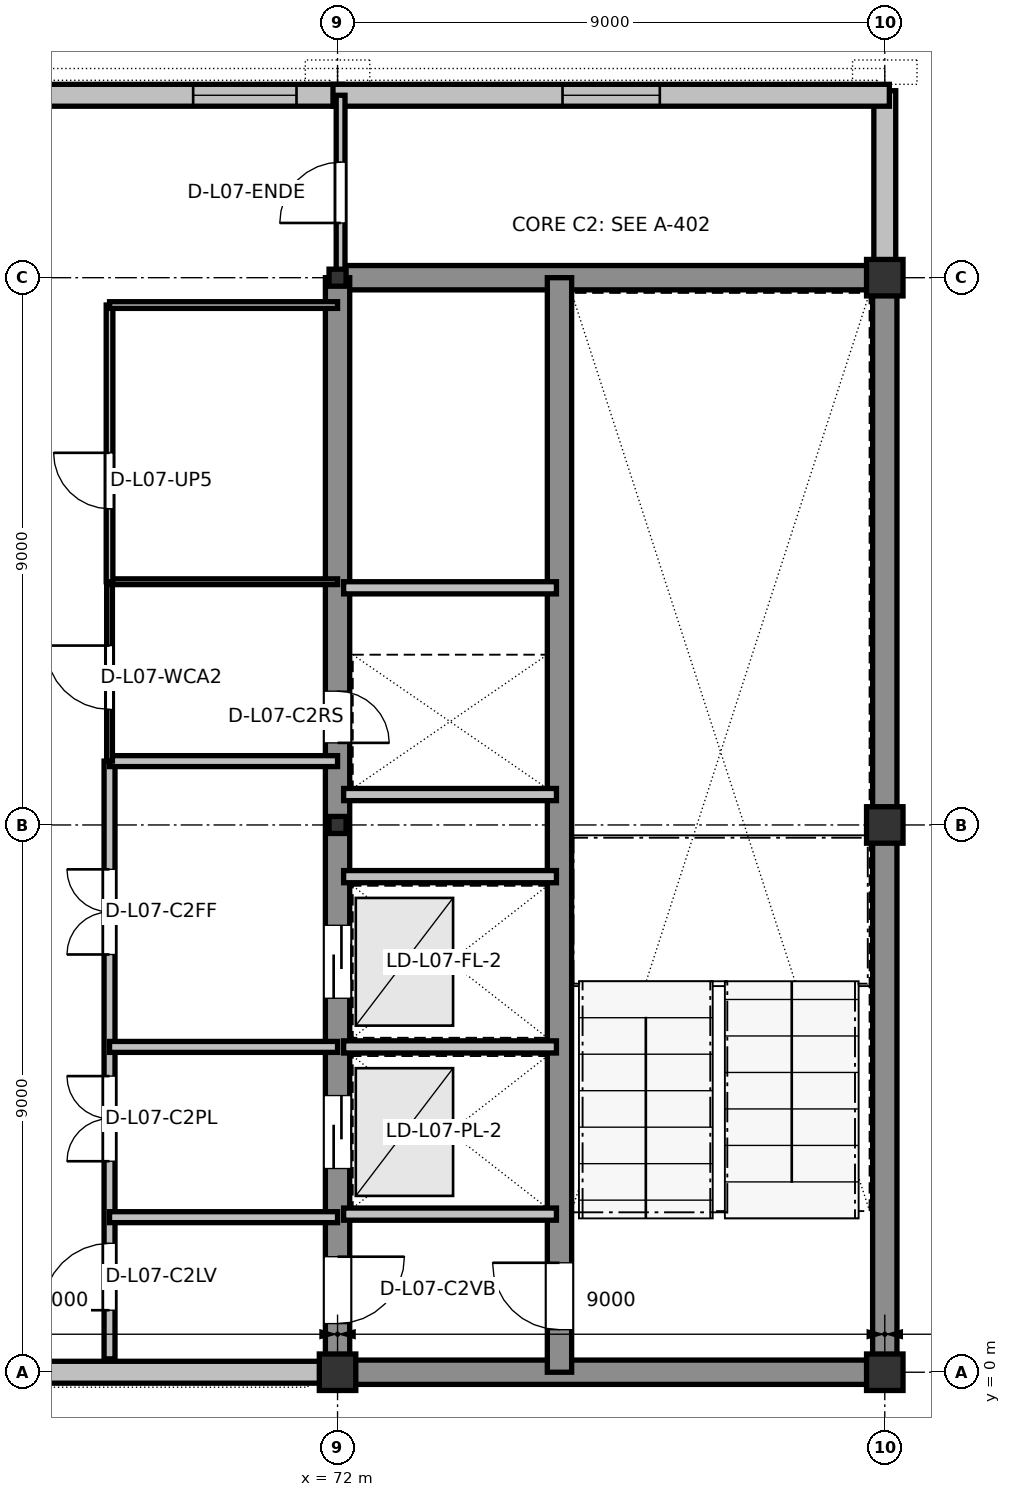
"""IFC4 building model, lengths in metres.
Left out: names, types, materials, properties, quantities, classifications, styles, units other than length and angle.
Written with IfcOpenShell. Run it as: python <this file> out.ifc"""

import sys

from ifc_helpers import new_model, si_unit, direction, frame, frame_2d, origin, origin_2d, place, context, subcontext, project, spatial, rectangle, i_section, extrude, element, fill, save


model = new_model("IFC4")
c1 = context("Model", 3, precision=1e-05, world=origin(), true_north=direction((0.0, 1.0)))
c2 = subcontext(c1, "Body", "Model", "MODEL_VIEW")
j1 = project(units=[si_unit("LENGTHUNIT", "METRE"), si_unit("PLANEANGLEUNIT", "RADIAN")], contexts=[c1])
p1 = place(None, origin())
s1 = spatial("IfcSite", under=j1, at=p1, CompositionType="ELEMENT")
p2 = place(p1, origin())
s2 = spatial("IfcBuilding", under=s1, at=p2, CompositionType="ELEMENT")
p3 = place(p2, frame((0.0, 0.0, 31.8)))
s3 = spatial("IfcBuildingStorey", under=s2, at=p3, CompositionType="ELEMENT", Elevation=31.8)
p4 = place(p3, frame((72.0, 0.0, 0.0), z_axis=(0.0, 0.0, 1.0), x_axis=(1.0, 0.0, 0.0)))
e1 = element("IfcColumn", 1, at=p4, inside=s3, PredefinedType="COLUMN", context=c2, shape_type="SweptSolid", body=[
    extrude(rectangle(XDim=0.6, YDim=0.6, at=origin_2d()), origin(), (0.0, 0.0, 1.0), 4.2),
])
for number, where, z_axis, x_axis in (
    (2, (72.0, 9.0, 0.0), (0.0, 0.0, 1.0), (1.0, 0.0, 0.0)),
    (3, (72.0, 18.0, 0.0), (0.0, 0.0, 1.0), (1.0, 0.0, 0.0)),
):
    element("IfcColumn", number, at=place(p3, frame(where, z_axis=z_axis, x_axis=x_axis)), inside=s3, PredefinedType="COLUMN", context=c2, shape_type="SweptSolid", body=[
        extrude(i_section(OverallWidth=0.28, OverallDepth=0.28, WebThickness=0.01, FlangeThickness=0.018, at=origin_2d()), origin(), (0.0, 0.0, 1.0), 4.2),
    ])
for number, where, z_axis, x_axis in (
    (4, (81.0, 0.0, 0.0), (0.0, 0.0, 1.0), (1.0, 0.0, 0.0)),
    (5, (81.0, 9.0, 0.0), (0.0, 0.0, 1.0), (1.0, 0.0, 0.0)),
    (6, (81.0, 18.0, 0.0), (0.0, 0.0, 1.0), (1.0, 0.0, 0.0)),
):
    element("IfcColumn", number, at=place(p3, frame(where, z_axis=z_axis, x_axis=x_axis)), inside=s3, PredefinedType="COLUMN", context=c2, shape_type="SweptSolid", body=[
        extrude(rectangle(XDim=0.6, YDim=0.6, at=origin_2d()), origin(), (0.0, 0.0, 1.0), 4.2),
    ])
p5 = place(p3, frame((81.0, 18.285, 0.0), z_axis=(0.0, 0.0, 1.0), x_axis=(0.0, 1.0, 0.0)))
e7 = element("IfcWall", 7, at=p5, inside=s3, PredefinedType="STANDARD", context=c2, shape_type="SweptSolid", body=[
    extrude(rectangle(XDim=2.79, YDim=0.36, at=frame_2d((1.395, 0.0))), origin(), (0.0, 0.0, 1.0), 3.94),
])
p6 = place(p3, frame((72.075, 21.0, 0.0), z_axis=(0.0, 0.0, 1.0), x_axis=(-1.0, 0.0, 0.0)))
e8 = element("IfcWall", 8, at=p6, inside=s3, PredefinedType="STANDARD", context=c2, shape_type="SweptSolid", body=[
    extrude(rectangle(XDim=9.15, YDim=0.36, at=frame_2d((4.575, 0.0))), origin(), (0.0, 0.0, 1.0), 3.94),
])
p7 = place(p6, frame((0.75, 0.0, 0.9)))
e9 = element("IfcOpeningElement", 9, at=p7, cuts=e8, PredefinedType="OPENING", context=c2, shape_type="SweptSolid", body=[
    extrude(rectangle(XDim=1.7, YDim=2.05, at=frame_2d((0.85, 1.025))), frame((0.0, 0.19, 0.0), z_axis=(0.0, -1.0, 0.0), x_axis=(1.0, 0.0, 0.0)), (0.0, 0.0, 1.0), 0.38),
])
p8 = place(p3, frame((81.075, 21.0, 0.0), z_axis=(0.0, 0.0, 1.0), x_axis=(-1.0, 0.0, 0.0)))
e10 = element("IfcWall", 10, at=p8, inside=s3, PredefinedType="STANDARD", context=c2, shape_type="SweptSolid", body=[
    extrude(rectangle(XDim=9.15, YDim=0.36, at=frame_2d((4.575, 0.0))), origin(), (0.0, 0.0, 1.0), 3.94),
])
p9 = place(p8, frame((3.775, 0.0, 0.9)))
e11 = element("IfcOpeningElement", 11, at=p9, cuts=e10, PredefinedType="OPENING", context=c2, shape_type="SweptSolid", body=[
    extrude(rectangle(XDim=1.6, YDim=2.0, at=frame_2d((0.8, 1.0))), frame((0.0, 0.19, 0.0), z_axis=(0.0, -1.0, 0.0), x_axis=(1.0, 0.0, 0.0)), (0.0, 0.0, 1.0), 0.38),
])
p10 = place(p3, frame((63.285, 0.0, 0.0), z_axis=(0.0, 0.0, 1.0), x_axis=(1.0, 0.0, 0.0)))
e12 = element("IfcWall", 12, at=p10, inside=s3, PredefinedType="STANDARD", context=c2, shape_type="SweptSolid", body=[
    extrude(rectangle(XDim=8.43, YDim=0.36, at=frame_2d((4.215, 0.0))), origin(), (0.0, 0.0, 1.0), 3.735),
])
p11 = place(p10, frame((0.75, 0.0, 0.9)))
e13 = element("IfcOpeningElement", 13, at=p11, cuts=e12, PredefinedType="OPENING", context=c2, shape_type="SweptSolid", body=[
    extrude(rectangle(XDim=1.1, YDim=1.75, at=frame_2d((0.55, 0.875))), frame((0.0, 0.19, 0.0), z_axis=(0.0, -1.0, 0.0), x_axis=(1.0, 0.0, 0.0)), (0.0, 0.0, 1.0), 0.38),
])
p12 = place(p3, frame((72.0, 0.0, 0.0), z_axis=(0.0, 0.0, 1.0), x_axis=(1.0, 0.0, 0.0)))
e14 = element("IfcWall", 14, at=p12, inside=s3, PredefinedType="SHEAR", context=c2, shape_type="SweptSolid", body=[
    extrude(rectangle(XDim=9.0, YDim=0.4, at=frame_2d((4.5, 0.0))), origin(), (0.0, 0.0, 1.0), 3.96),
])
p13 = place(p3, frame((81.0, 0.0, 0.0), z_axis=(0.0, 0.0, 1.0), x_axis=(0.0, 1.0, 0.0)))
e15 = element("IfcWall", 15, at=p13, inside=s3, PredefinedType="SHEAR", context=c2, shape_type="SweptSolid", body=[
    extrude(rectangle(XDim=18.0, YDim=0.4, at=frame_2d((9.0, 0.0))), origin(), (0.0, 0.0, 1.0), 3.96),
])
p14 = place(p3, frame((81.0, 18.0, 0.0), z_axis=(0.0, 0.0, 1.0), x_axis=(-1.0, 0.0, 0.0)))
e16 = element("IfcWall", 16, at=p14, inside=s3, PredefinedType="SHEAR", context=c2, shape_type="SweptSolid", body=[
    extrude(rectangle(XDim=9.0, YDim=0.4, at=frame_2d((4.5, 0.0))), origin(), (0.0, 0.0, 1.0), 3.96),
])
p15 = place(p3, frame((72.0, 18.0, 0.0), z_axis=(0.0, 0.0, 1.0), x_axis=(0.0, -1.0, 0.0)))
e17 = element("IfcWall", 17, at=p15, inside=s3, PredefinedType="SHEAR", context=c2, shape_type="SweptSolid", body=[
    extrude(rectangle(XDim=18.0, YDim=0.4, at=frame_2d((9.0, 0.0))), origin(), (0.0, 0.0, 1.0), 3.96),
])
p16 = place(p15, frame((16.1, 0.0, 0.0)))
e18 = element("IfcOpeningElement", 18, at=p16, cuts=e17, PredefinedType="OPENING", context=c2, shape_type="SweptSolid", body=[
    extrude(rectangle(XDim=1.1, YDim=2.16, at=frame_2d((0.55, 1.08))), frame((0.0, 0.21, 0.0), z_axis=(0.0, -1.0, 0.0), x_axis=(1.0, 0.0, 0.0)), (0.0, 0.0, 1.0), 0.42),
])
p17 = place(p15, frame((13.45, 0.0, 0.0)))
e19 = element("IfcOpeningElement", 19, at=p17, cuts=e17, PredefinedType="OPENING", context=c2, shape_type="SweptSolid", body=[
    extrude(rectangle(XDim=1.2, YDim=2.2, at=frame_2d((0.6, 1.1))), frame((0.0, 0.21, 0.0), z_axis=(0.0, -1.0, 0.0), x_axis=(1.0, 0.0, 0.0)), (0.0, 0.0, 1.0), 0.42),
])
p18 = place(p15, frame((10.65, 0.0, 0.0)))
e20 = element("IfcOpeningElement", 20, at=p18, cuts=e17, PredefinedType="OPENING", context=c2, shape_type="SweptSolid", body=[
    extrude(rectangle(XDim=1.2, YDim=2.2, at=frame_2d((0.6, 1.1))), frame((0.0, 0.21, 0.0), z_axis=(0.0, -1.0, 0.0), x_axis=(1.0, 0.0, 0.0)), (0.0, 0.0, 1.0), 0.42),
])
p19 = place(p15, frame((6.8, 0.0, 0.0)))
e21 = element("IfcOpeningElement", 21, at=p19, cuts=e17, PredefinedType="OPENING", context=c2, shape_type="SweptSolid", body=[
    extrude(rectangle(XDim=0.85, YDim=2.1, at=frame_2d((0.425, 1.05))), frame((0.0, 0.21, 0.0), z_axis=(0.0, -1.0, 0.0), x_axis=(1.0, 0.0, 0.0)), (0.0, 0.0, 1.0), 0.42),
])
p20 = place(p3, frame((75.65, 0.0, 0.0), z_axis=(0.0, 0.0, 1.0), x_axis=(0.0, 1.0, 0.0)))
e22 = element("IfcWall", 22, at=p20, inside=s3, PredefinedType="SHEAR", context=c2, shape_type="SweptSolid", body=[
    extrude(rectangle(XDim=18.0, YDim=0.4, at=frame_2d((9.0, 0.0))), origin(), (0.0, 0.0, 1.0), 3.96),
])
p21 = place(p20, frame((0.7, 0.0, 0.0)))
e23 = element("IfcOpeningElement", 23, at=p21, cuts=e22, PredefinedType="OPENING", context=c2, shape_type="SweptSolid", body=[
    extrude(rectangle(XDim=1.1, YDim=2.16, at=frame_2d((0.55, 1.08))), frame((0.0, 0.21, 0.0), z_axis=(0.0, -1.0, 0.0), x_axis=(1.0, 0.0, 0.0)), (0.0, 0.0, 1.0), 0.42),
])
for number, where, z_axis, x_axis in (
    (24, (72.1, 2.6, 0.0), (0.0, 0.0, 1.0), (1.0, 0.0, 0.0)),
    (25, (72.1, 5.35, 0.0), (0.0, 0.0, 1.0), (1.0, 0.0, 0.0)),
    (26, (72.1, 8.15, 0.0), (0.0, 0.0, 1.0), (1.0, 0.0, 0.0)),
    (27, (72.1, 9.5, 0.0), (0.0, 0.0, 1.0), (1.0, 0.0, 0.0)),
    (28, (72.1, 12.9, 0.0), (0.0, 0.0, 1.0), (1.0, 0.0, 0.0)),
):
    element("IfcWall", number, at=place(p3, frame(where, z_axis=z_axis, x_axis=x_axis)), inside=s3, PredefinedType="PARTITIONING", context=c2, shape_type="SweptSolid", body=[
        extrude(rectangle(XDim=3.5, YDim=0.2, at=frame_2d((1.75, 0.0))), origin(), (0.0, 0.0, 1.0), 3.96),
    ])
p22 = place(p3, frame((68.25, 0.22, 0.0), z_axis=(0.0, 0.0, 1.0), x_axis=(0.0, 1.0, 0.0)))
e29 = element("IfcWall", 29, at=p22, inside=s3, PredefinedType="PARTITIONING", context=c2, shape_type="SweptSolid", body=[
    extrude(rectangle(XDim=9.83, YDim=0.18, at=frame_2d((4.915, 0.0))), origin(), (0.0, 0.0, 1.0), 3.96),
])
p23 = place(p22, frame((0.8, 0.0, 0.0)))
e30 = element("IfcOpeningElement", 30, at=p23, cuts=e29, PredefinedType="OPENING", context=c2, shape_type="SweptSolid", body=[
    extrude(rectangle(XDim=1.1, YDim=2.16, at=frame_2d((0.55, 1.08))), frame((0.0, 0.1, 0.0), z_axis=(0.0, -1.0, 0.0), x_axis=(1.0, 0.0, 0.0)), (0.0, 0.0, 1.0), 0.2),
])
p24 = place(p22, frame((3.25, 0.0, 0.0)))
e31 = element("IfcOpeningElement", 31, at=p24, cuts=e29, PredefinedType="OPENING", context=c2, shape_type="SweptSolid", body=[
    extrude(rectangle(XDim=1.4, YDim=2.2, at=frame_2d((0.7, 1.1))), frame((0.0, 0.1, 0.0), z_axis=(0.0, -1.0, 0.0), x_axis=(1.0, 0.0, 0.0)), (0.0, 0.0, 1.0), 0.2),
])
p25 = place(p22, frame((6.65, 0.0, 0.0)))
e32 = element("IfcOpeningElement", 32, at=p25, cuts=e29, PredefinedType="OPENING", context=c2, shape_type="SweptSolid", body=[
    extrude(rectangle(XDim=1.4, YDim=2.2, at=frame_2d((0.7, 1.1))), frame((0.0, 0.1, 0.0), z_axis=(0.0, -1.0, 0.0), x_axis=(1.0, 0.0, 0.0)), (0.0, 0.0, 1.0), 0.2),
])
for number, where, z_axis, x_axis in (
    (33, (68.25, 2.55, 0.0), (0.0, 0.0, 1.0), (1.0, 0.0, 0.0)),
    (34, (68.25, 5.35, 0.0), (0.0, 0.0, 1.0), (1.0, 0.0, 0.0)),
    (35, (68.25, 10.05, 0.0), (0.0, 0.0, 1.0), (1.0, 0.0, 0.0)),
):
    element("IfcWall", number, at=place(p3, frame(where, z_axis=z_axis, x_axis=x_axis)), inside=s3, PredefinedType="PARTITIONING", context=c2, shape_type="SweptSolid", body=[
        extrude(rectangle(XDim=3.75, YDim=0.18, at=frame_2d((1.875, 0.0))), origin(), (0.0, 0.0, 1.0), 3.96),
    ])
p26 = place(p3, frame((68.25, 10.05, 0.0), z_axis=(0.0, 0.0, 1.0), x_axis=(0.0, 1.0, 0.0)))
e36 = element("IfcWall", 36, at=p26, inside=s3, PredefinedType="PARTITIONING", context=c2, shape_type="SweptSolid", body=[
    extrude(rectangle(XDim=2.95, YDim=0.095, at=frame_2d((1.475, 0.0))), origin(), (0.0, 0.0, 1.0), 3.96),
])
p27 = place(p26, frame((0.85, 0.0, 0.0)))
e37 = element("IfcOpeningElement", 37, at=p27, cuts=e36, PredefinedType="OPENING", context=c2, shape_type="SweptSolid", body=[
    extrude(rectangle(XDim=1.05, YDim=2.13, at=frame_2d((0.525, 1.065))), frame((0.0, 0.057, 0.0), z_axis=(0.0, -1.0, 0.0), x_axis=(1.0, 0.0, 0.0)), (0.0, 0.0, 1.0), 0.115),
])
p28 = place(p3, frame((68.25, 13.0, 0.0), z_axis=(0.0, 0.0, 1.0), x_axis=(1.0, 0.0, 0.0)))
e38 = element("IfcWall", 38, at=p28, inside=s3, PredefinedType="PARTITIONING", context=c2, shape_type="SweptSolid", body=[
    extrude(rectangle(XDim=3.75, YDim=0.095, at=frame_2d((1.875, 0.0))), origin(), (0.0, 0.0, 1.0), 3.96),
])
p29 = place(p3, frame((72.05, 18.0, 0.0), z_axis=(0.0, 0.0, 1.0), x_axis=(0.0, 1.0, 0.0)))
e39 = element("IfcWall", 39, at=p29, inside=s3, PredefinedType="PARTITIONING", context=c2, shape_type="SweptSolid", body=[
    extrude(rectangle(XDim=3.0, YDim=0.145, at=frame_2d((1.5, 0.0))), origin(), (0.0, 0.0, 1.0), 3.96),
])
p30 = place(p29, frame((0.9, 0.0, 0.0)))
e40 = element("IfcOpeningElement", 40, at=p30, cuts=e39, PredefinedType="OPENING", context=c2, shape_type="SweptSolid", body=[
    extrude(rectangle(XDim=1.0, YDim=2.14, at=frame_2d((0.5, 1.07))), frame((0.0, 0.083, 0.0), z_axis=(0.0, -1.0, 0.0), x_axis=(1.0, 0.0, 0.0)), (0.0, 0.0, 1.0), 0.165),
])
p31 = place(p3, frame((68.25, 13.0, 0.0), z_axis=(0.0, 0.0, 1.0), x_axis=(0.0, 1.0, 0.0)))
e41 = element("IfcWall", 41, at=p31, inside=s3, PredefinedType="PARTITIONING", context=c2, shape_type="SweptSolid", body=[
    extrude(rectangle(XDim=4.55, YDim=0.11, at=frame_2d((2.275, 0.0))), origin(), (0.0, 0.0, 1.0), 3.96),
])
p32 = place(p31, frame((1.2, 0.0, 0.0)))
e42 = element("IfcOpeningElement", 42, at=p32, cuts=e41, PredefinedType="OPENING", context=c2, shape_type="SweptSolid", body=[
    extrude(rectangle(XDim=0.92, YDim=2.1, at=frame_2d((0.46, 1.05))), frame((0.0, 0.065, 0.0), z_axis=(0.0, -1.0, 0.0), x_axis=(1.0, 0.0, 0.0)), (0.0, 0.0, 1.0), 0.13),
])
p33 = place(p3, frame((68.25, 17.55, 0.0), z_axis=(0.0, 0.0, 1.0), x_axis=(1.0, 0.0, 0.0)))
e43 = element("IfcWall", 43, at=p33, inside=s3, PredefinedType="PARTITIONING", context=c2, shape_type="SweptSolid", body=[
    extrude(rectangle(XDim=3.75, YDim=0.11, at=frame_2d((1.875, 0.0))), origin(), (0.0, 0.0, 1.0), 3.96),
])
p34 = place(p7, origin())
e44 = element("IfcWindow", 44, at=p34, inside=s3, PartitioningType="SINGLE_PANEL", PredefinedType="WINDOW", context=c2, shape_type="SweptSolid", body=[
    extrude(rectangle(XDim=1.7, YDim=2.05, at=frame_2d((0.85, 1.025))), frame((0.0, 0.03, 0.0), z_axis=(0.0, -1.0, 0.0), x_axis=(1.0, 0.0, 0.0)), (0.0, 0.0, 1.0), 0.06),
])
fill(e9, e44)
p35 = place(p9, origin())
e45 = element("IfcWindow", 45, at=p35, inside=s3, PartitioningType="SINGLE_PANEL", PredefinedType="WINDOW", context=c2, shape_type="SweptSolid", body=[
    extrude(rectangle(XDim=1.6, YDim=2.0, at=frame_2d((0.8, 1.0))), frame((0.0, 0.03, 0.0), z_axis=(0.0, -1.0, 0.0), x_axis=(1.0, 0.0, 0.0)), (0.0, 0.0, 1.0), 0.06),
])
fill(e11, e45)
p36 = place(p21, origin())
e46 = element("IfcDoor", 46, at=p36, inside=s3, OperationType="SINGLE_SWING_RIGHT", PredefinedType="DOOR", context=c2, shape_type="SweptSolid", body=[
    extrude(rectangle(XDim=1.1, YDim=2.16, at=frame_2d((0.55, 1.08))), frame((0.0, 0.025, 0.0), z_axis=(0.0, -1.0, 0.0), x_axis=(1.0, 0.0, 0.0)), (0.0, 0.0, 1.0), 0.05),
])
fill(e23, e46)
p37 = place(p16, origin())
e47 = element("IfcDoor", 47, at=p37, inside=s3, OperationType="SINGLE_SWING_LEFT", PredefinedType="DOOR", context=c2, shape_type="SweptSolid", body=[
    extrude(rectangle(XDim=1.1, YDim=2.16, at=frame_2d((0.55, 1.08))), frame((0.0, 0.025, 0.0), z_axis=(0.0, -1.0, 0.0), x_axis=(1.0, 0.0, 0.0)), (0.0, 0.0, 1.0), 0.05),
])
fill(e18, e47)
p38 = place(p17, origin())
e48 = element("IfcDoor", 48, at=p38, inside=s3, OperationType="SLIDING_TO_LEFT", PredefinedType="DOOR", context=c2, shape_type="SweptSolid", body=[
    extrude(rectangle(XDim=1.2, YDim=2.2, at=frame_2d((0.6, 1.1))), frame((0.0, 0.025, 0.0), z_axis=(0.0, -1.0, 0.0), x_axis=(1.0, 0.0, 0.0)), (0.0, 0.0, 1.0), 0.05),
])
fill(e19, e48)
p39 = place(p18, origin())
e49 = element("IfcDoor", 49, at=p39, inside=s3, OperationType="SLIDING_TO_LEFT", PredefinedType="DOOR", context=c2, shape_type="SweptSolid", body=[
    extrude(rectangle(XDim=1.2, YDim=2.2, at=frame_2d((0.6, 1.1))), frame((0.0, 0.025, 0.0), z_axis=(0.0, -1.0, 0.0), x_axis=(1.0, 0.0, 0.0)), (0.0, 0.0, 1.0), 0.05),
])
fill(e20, e49)
p40 = place(p19, origin())
e50 = element("IfcDoor", 50, at=p40, inside=s3, OperationType="SINGLE_SWING_RIGHT", PredefinedType="DOOR", context=c2, shape_type="SweptSolid", body=[
    extrude(rectangle(XDim=0.85, YDim=2.1, at=frame_2d((0.425, 1.05))), frame((0.0, 0.025, 0.0), z_axis=(0.0, -1.0, 0.0), x_axis=(1.0, 0.0, 0.0)), (0.0, 0.0, 1.0), 0.05),
])
fill(e21, e50)
p41 = place(p23, origin())
e51 = element("IfcDoor", 51, at=p41, inside=s3, OperationType="SINGLE_SWING_LEFT", PredefinedType="DOOR", context=c2, shape_type="SweptSolid", body=[
    extrude(rectangle(XDim=1.1, YDim=2.16, at=frame_2d((0.55, 1.08))), frame((0.0, 0.025, 0.0), z_axis=(0.0, -1.0, 0.0), x_axis=(1.0, 0.0, 0.0)), (0.0, 0.0, 1.0), 0.05),
])
fill(e30, e51)
p42 = place(p24, origin())
e52 = element("IfcDoor", 52, at=p42, inside=s3, OperationType="DOUBLE_DOOR_SINGLE_SWING", PredefinedType="DOOR", context=c2, shape_type="SweptSolid", body=[
    extrude(rectangle(XDim=1.4, YDim=2.2, at=frame_2d((0.7, 1.1))), frame((0.0, 0.025, 0.0), z_axis=(0.0, -1.0, 0.0), x_axis=(1.0, 0.0, 0.0)), (0.0, 0.0, 1.0), 0.05),
])
fill(e31, e52)
p43 = place(p25, origin())
e53 = element("IfcDoor", 53, at=p43, inside=s3, OperationType="DOUBLE_DOOR_SINGLE_SWING", PredefinedType="DOOR", context=c2, shape_type="SweptSolid", body=[
    extrude(rectangle(XDim=1.4, YDim=2.2, at=frame_2d((0.7, 1.1))), frame((0.0, 0.025, 0.0), z_axis=(0.0, -1.0, 0.0), x_axis=(1.0, 0.0, 0.0)), (0.0, 0.0, 1.0), 0.05),
])
fill(e32, e53)
p44 = place(p27, origin())
e54 = element("IfcDoor", 54, at=p44, inside=s3, OperationType="SINGLE_SWING_RIGHT", PredefinedType="DOOR", context=c2, shape_type="SweptSolid", body=[
    extrude(rectangle(XDim=1.05, YDim=2.13, at=frame_2d((0.525, 1.065))), frame((0.0, 0.025, 0.0), z_axis=(0.0, -1.0, 0.0), x_axis=(1.0, 0.0, 0.0)), (0.0, 0.0, 1.0), 0.05),
])
fill(e37, e54)
p45 = place(p30, origin())
e55 = element("IfcDoor", 55, at=p45, inside=s3, OperationType="SINGLE_SWING_LEFT", PredefinedType="DOOR", context=c2, shape_type="SweptSolid", body=[
    extrude(rectangle(XDim=1.0, YDim=2.14, at=frame_2d((0.5, 1.07))), frame((0.0, 0.025, 0.0), z_axis=(0.0, -1.0, 0.0), x_axis=(1.0, 0.0, 0.0)), (0.0, 0.0, 1.0), 0.05),
])
fill(e40, e55)
p46 = place(p32, origin())
e56 = element("IfcDoor", 56, at=p46, inside=s3, OperationType="SINGLE_SWING_RIGHT", PredefinedType="DOOR", context=c2, shape_type="SweptSolid", body=[
    extrude(rectangle(XDim=0.92, YDim=2.1, at=frame_2d((0.46, 1.05))), frame((0.0, 0.025, 0.0), z_axis=(0.0, -1.0, 0.0), x_axis=(1.0, 0.0, 0.0)), (0.0, 0.0, 1.0), 0.05),
])
fill(e42, e56)
save(model, sys.argv[1])
